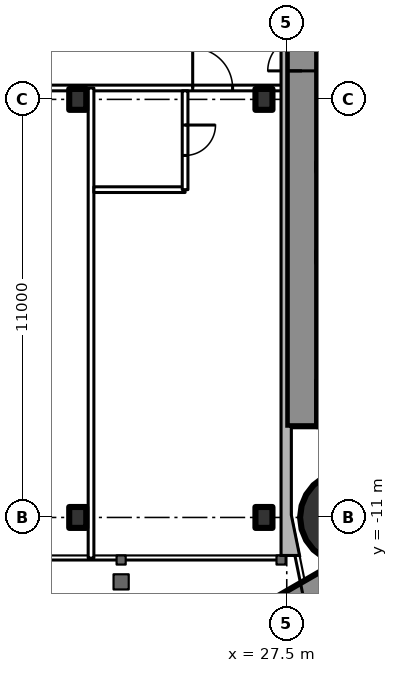
"""IFC4 building model, lengths in metres.
Left out: names, types, materials, properties, quantities, classifications, styles, units other than length and angle.
Written with IfcOpenShell. Run it as: python <this file> out.ifc"""

import sys

from ifc_helpers import new_model, si_unit, direction, frame, frame_2d, origin, origin_2d, place, context, subcontext, project, spatial, rectangle, circle, i_section, extrude, element, fill, save


model = new_model("IFC4")
c1 = context("Model", 3, precision=1e-05, world=origin(), true_north=direction((0.0, 1.0)))
c2 = subcontext(c1, "Body", "Model", "MODEL_VIEW")
j1 = project(units=[si_unit("LENGTHUNIT", "METRE"), si_unit("PLANEANGLEUNIT", "RADIAN")], contexts=[c1])
p1 = place(None, origin())
s1 = spatial("IfcSite", under=j1, at=p1, CompositionType="ELEMENT")
p2 = place(p1, origin())
s2 = spatial("IfcBuilding", under=s1, at=p2, CompositionType="ELEMENT")
p3 = place(p2, frame((0.0, 0.0, 247.7)))
s3 = spatial("IfcBuildingStorey", under=s2, at=p3, CompositionType="ELEMENT", Elevation=247.7)
p4 = place(p3, frame((29.05, -11.0, 0.0), z_axis=(0.0, 0.0, 1.0), x_axis=(1.0, 0.0, 0.0)))
e1 = element("IfcColumn", 1, at=p4, inside=s3, PredefinedType="COLUMN", context=c2, shape_type="SweptSolid", body=[
    extrude(circle(Radius=1.2, at=origin_2d()), origin(), (0.0, 0.0, 1.0), 4.2),
])
p5 = place(p3, frame((27.9, -8.6, 0.0), z_axis=(0.0, 0.0, 1.0), x_axis=(0.0, 1.0, 0.0)))
e2 = element("IfcWall", 2, at=p5, inside=s3, PredefinedType="SHEAR", context=c2, shape_type="SweptSolid", body=[
    extrude(rectangle(XDim=17.2, YDim=0.8, at=frame_2d((8.6, 0.0))), origin(), (0.0, 0.0, 1.0), 4.2),
])
p6 = place(p5, frame((9.35, 0.0, 0.0)))
e3 = element("IfcOpeningElement", 3, at=p6, cuts=e2, PredefinedType="OPENING", context=c2, shape_type="SweptSolid", body=[
    extrude(rectangle(XDim=0.9, YDim=2.2, at=frame_2d((0.45, 1.1))), frame((0.0, 0.41, 0.0), z_axis=(0.0, -1.0, 0.0), x_axis=(1.0, 0.0, 0.0)), (0.0, 0.0, 1.0), 0.82),
])
p7 = place(p3, frame((28.3, -8.0, 0.0), z_axis=(0.0, 0.0, 1.0), x_axis=(1.0, 0.0, 0.0)))
e4 = element("IfcWall", 4, at=p7, inside=s3, PredefinedType="SHEAR", context=c2, shape_type="SweptSolid", body=[
    extrude(rectangle(XDim=8.4, YDim=1.2, at=frame_2d((4.2, 0.0))), origin(), (0.0, 0.0, 1.0), 4.2),
])
p8 = place(p7, frame((0.25, 0.0, 0.0)))
e5 = element("IfcOpeningElement", 5, at=p8, cuts=e4, PredefinedType="OPENING", context=c2, shape_type="SweptSolid", body=[
    extrude(rectangle(XDim=1.0, YDim=2.2, at=frame_2d((0.5, 1.1))), frame((0.0, 0.61, 0.0), z_axis=(0.0, -1.0, 0.0), x_axis=(1.0, 0.0, 0.0)), (0.0, 0.0, 1.0), 1.22),
])
p9 = place(p3, frame((28.3, -4.15, 0.0), z_axis=(0.0, 0.0, 1.0), x_axis=(1.0, 0.0, 0.0)))
e6 = element("IfcWall", 6, at=p9, inside=s3, PredefinedType="SHEAR", context=c2, shape_type="SweptSolid", body=[
    extrude(rectangle(XDim=8.4, YDim=0.3, at=frame_2d((4.2, 0.0))), origin(), (0.0, 0.0, 1.0), 4.2),
])
p10 = place(p3, frame((28.3, -1.775, 0.0), z_axis=(0.0, 0.0, 1.0), x_axis=(1.0, 0.0, 0.0)))
e7 = element("IfcWall", 7, at=p10, inside=s3, PredefinedType="SHEAR", context=c2, shape_type="SweptSolid", body=[
    extrude(rectangle(XDim=2.9, YDim=0.25, at=frame_2d((1.45, 0.0))), origin(), (0.0, 0.0, 1.0), 4.2),
])
p11 = place(p3, frame((27.2, -13.8, 0.0), z_axis=(0.0, 0.0, 1.0), x_axis=(0.866027159892, 0.499996958321, 0.0)))
e8 = element("IfcWall", 8, at=p11, inside=s3, PredefinedType="SHEAR", context=c2, shape_type="SweptSolid", body=[
    extrude(rectangle(XDim=27.947, YDim=1.2, at=frame_2d((13.973, 0.0))), origin(), (0.0, 0.0, 1.0), 4.2),
])
p12 = place(p11, frame((4.6, 0.0, 0.0)))
e9 = element("IfcOpeningElement", 9, at=p12, cuts=e8, PredefinedType="OPENING", context=c2, shape_type="SweptSolid", body=[
    extrude(rectangle(XDim=1.0, YDim=2.2, at=frame_2d((0.5, 1.1))), frame((0.0, 0.61, 0.0), z_axis=(0.0, -1.0, 0.0), x_axis=(1.0, 0.0, 0.0)), (0.0, 0.0, 1.0), 1.22),
])
p13 = place(p11, frame((13.395, 0.0, 0.0)))
e10 = element("IfcOpeningElement", 10, at=p13, cuts=e8, PredefinedType="OPENING", context=c2, shape_type="SweptSolid", body=[
    extrude(rectangle(XDim=1.8, YDim=2.2, at=frame_2d((0.9, 1.1))), frame((0.0, 0.61, 0.0), z_axis=(0.0, -1.0, 0.0), x_axis=(1.0, 0.0, 0.0)), (0.0, 0.0, 1.0), 1.22),
])
p14 = place(p3, frame((27.2, 13.8, 0.0), z_axis=(0.0, 0.0, 1.0), x_axis=(0.866024515034, -0.500001539357, 0.0)))
e11 = element("IfcWall", 11, at=p14, inside=s3, PredefinedType="SHEAR", context=c2, shape_type="SweptSolid", body=[
    extrude(rectangle(XDim=26.907, YDim=1.2, at=frame_2d((13.454, 0.0))), origin(), (0.0, 0.0, 1.0), 4.2),
])
p15 = place(p14, frame((4.6, 0.0, 0.0)))
e12 = element("IfcOpeningElement", 12, at=p15, cuts=e11, PredefinedType="OPENING", context=c2, shape_type="SweptSolid", body=[
    extrude(rectangle(XDim=1.0, YDim=2.2, at=frame_2d((0.5, 1.1))), frame((0.0, 0.61, 0.0), z_axis=(0.0, -1.0, 0.0), x_axis=(1.0, 0.0, 0.0)), (0.0, 0.0, 1.0), 1.22),
])
p16 = place(p14, frame((13.395, 0.0, 0.0)))
e13 = element("IfcOpeningElement", 13, at=p16, cuts=e11, PredefinedType="OPENING", context=c2, shape_type="SweptSolid", body=[
    extrude(rectangle(XDim=1.8, YDim=2.2, at=frame_2d((0.9, 1.1))), frame((0.0, 0.61, 0.0), z_axis=(0.0, -1.0, 0.0), x_axis=(1.0, 0.0, 0.0)), (0.0, 0.0, 1.0), 1.22),
])
for number, where, z_axis, x_axis in (
    (14, (22.0, -11.0, 0.0), (0.0, 0.0, 1.0), (1.0, 0.0, 0.0)),
    (15, (26.9, -11.0, 0.0), (0.0, 0.0, 1.0), (1.0, 0.0, 0.0)),
    (16, (22.0, 0.0, 0.0), (0.0, 0.0, 1.0), (1.0, 0.0, 0.0)),
    (17, (26.9, 0.0, 0.0), (0.0, 0.0, 1.0), (1.0, 0.0, 0.0)),
):
    element("IfcColumn", number, at=place(p3, frame(where, z_axis=z_axis, x_axis=x_axis)), inside=s3, PredefinedType="COLUMN", context=c2, shape_type="SweptSolid", body=[
        extrude(i_section(OverallWidth=0.448, OverallDepth=0.55, WebThickness=0.072, FlangeThickness=0.115, FilletRadius=0.02, at=origin_2d()), origin(), (0.0, 0.0, 1.0), 4.2),
    ])
p17 = place(p3, frame((-27.5, 0.3, 0.0), z_axis=(0.0, 0.0, 1.0), x_axis=(1.0, 0.0, 0.0)))
e18 = element("IfcWall", 18, at=p17, inside=s3, PredefinedType="PARTITIONING", context=c2, shape_type="SweptSolid", body=[
    extrude(rectangle(XDim=55.0, YDim=0.15, at=frame_2d((27.5, 0.0))), origin(), (0.0, 0.0, 1.0), 3.0),
])
p18 = place(p17, frame((1.575, 0.0, 0.0)))
e19 = element("IfcOpeningElement", 19, at=p18, cuts=e18, PredefinedType="OPENING", context=c2, shape_type="SweptSolid", body=[
    extrude(rectangle(XDim=1.0, YDim=2.2, at=frame_2d((0.5, 1.1))), frame((0.0, 0.085, 0.0), z_axis=(0.0, -1.0, 0.0), x_axis=(1.0, 0.0, 0.0)), (0.0, 0.0, 1.0), 0.17),
])
p19 = place(p17, frame((8.525, 0.0, 0.0)))
e20 = element("IfcOpeningElement", 20, at=p19, cuts=e18, PredefinedType="OPENING", context=c2, shape_type="SweptSolid", body=[
    extrude(rectangle(XDim=1.05, YDim=2.4, at=frame_2d((0.525, 1.2))), frame((0.0, 0.085, 0.0), z_axis=(0.0, -1.0, 0.0), x_axis=(1.0, 0.0, 0.0)), (0.0, 0.0, 1.0), 0.17),
])
p20 = place(p17, frame((19.525, 0.0, 0.0)))
e21 = element("IfcOpeningElement", 21, at=p20, cuts=e18, PredefinedType="OPENING", context=c2, shape_type="SweptSolid", body=[
    extrude(rectangle(XDim=1.05, YDim=2.4, at=frame_2d((0.525, 1.2))), frame((0.0, 0.085, 0.0), z_axis=(0.0, -1.0, 0.0), x_axis=(1.0, 0.0, 0.0)), (0.0, 0.0, 1.0), 0.17),
])
p21 = place(p17, frame((25.025, 0.0, 0.0)))
e22 = element("IfcOpeningElement", 22, at=p21, cuts=e18, PredefinedType="OPENING", context=c2, shape_type="SweptSolid", body=[
    extrude(rectangle(XDim=1.05, YDim=2.4, at=frame_2d((0.525, 1.2))), frame((0.0, 0.085, 0.0), z_axis=(0.0, -1.0, 0.0), x_axis=(1.0, 0.0, 0.0)), (0.0, 0.0, 1.0), 0.17),
])
p22 = place(p17, frame((30.525, 0.0, 0.0)))
e23 = element("IfcOpeningElement", 23, at=p22, cuts=e18, PredefinedType="OPENING", context=c2, shape_type="SweptSolid", body=[
    extrude(rectangle(XDim=1.05, YDim=2.4, at=frame_2d((0.525, 1.2))), frame((0.0, 0.085, 0.0), z_axis=(0.0, -1.0, 0.0), x_axis=(1.0, 0.0, 0.0)), (0.0, 0.0, 1.0), 0.17),
])
p23 = place(p17, frame((41.525, 0.0, 0.0)))
e24 = element("IfcOpeningElement", 24, at=p23, cuts=e18, PredefinedType="OPENING", context=c2, shape_type="SweptSolid", body=[
    extrude(rectangle(XDim=1.05, YDim=2.4, at=frame_2d((0.525, 1.2))), frame((0.0, 0.085, 0.0), z_axis=(0.0, -1.0, 0.0), x_axis=(1.0, 0.0, 0.0)), (0.0, 0.0, 1.0), 0.17),
])
p24 = place(p17, frame((52.525, 0.0, 0.0)))
e25 = element("IfcOpeningElement", 25, at=p24, cuts=e18, PredefinedType="OPENING", context=c2, shape_type="SweptSolid", body=[
    extrude(rectangle(XDim=1.05, YDim=2.4, at=frame_2d((0.525, 1.2))), frame((0.0, 0.085, 0.0), z_axis=(0.0, -1.0, 0.0), x_axis=(1.0, 0.0, 0.0)), (0.0, 0.0, 1.0), 0.17),
])
p25 = place(p3, frame((22.35, -12.07, 0.0), z_axis=(0.0, 0.0, 1.0), x_axis=(0.0, 1.0, 0.0)))
e26 = element("IfcWall", 26, at=p25, inside=s3, PredefinedType="PARTITIONING", context=c2, shape_type="SweptSolid", body=[
    extrude(rectangle(XDim=12.37, YDim=0.15, at=frame_2d((6.185, 0.0))), origin(), (0.0, 0.0, 1.0), 4.0),
])
p26 = place(p3, frame((22.425, -2.375, 0.0), z_axis=(0.0, 0.0, 1.0), x_axis=(1.0, 0.0, 0.0)))
e27 = element("IfcWall", 27, at=p26, inside=s3, PredefinedType="PARTITIONING", context=c2, shape_type="SweptSolid", body=[
    extrude(rectangle(XDim=2.4, YDim=0.15, at=frame_2d((1.2, 0.0))), origin(), (0.0, 0.0, 1.0), 4.0),
])
p27 = place(p3, frame((24.825, -2.375, 0.0), z_axis=(0.0, 0.0, 1.0), x_axis=(0.0, 1.0, 0.0)))
e28 = element("IfcWall", 28, at=p27, inside=s3, PredefinedType="PARTITIONING", context=c2, shape_type="SweptSolid", body=[
    extrude(rectangle(XDim=2.6, YDim=0.15, at=frame_2d((1.3, 0.0))), origin(), (0.0, 0.0, 1.0), 4.0),
])
p28 = place(p27, frame((0.9, 0.0, 0.0)))
e29 = element("IfcOpeningElement", 29, at=p28, cuts=e28, PredefinedType="OPENING", context=c2, shape_type="SweptSolid", body=[
    extrude(rectangle(XDim=0.8, YDim=2.2, at=frame_2d((0.4, 1.1))), frame((0.0, 0.085, 0.0), z_axis=(0.0, -1.0, 0.0), x_axis=(1.0, 0.0, 0.0)), (0.0, 0.0, 1.0), 0.17),
])
p29 = place(p6, origin())
e30 = element("IfcDoor", 30, at=p29, inside=s3, OperationType="SINGLE_SWING_LEFT", PredefinedType="DOOR", context=c2, shape_type="SweptSolid", body=[
    extrude(rectangle(XDim=0.9, YDim=2.2, at=frame_2d((0.45, 1.1))), frame((0.0, 0.025, 0.0), z_axis=(0.0, -1.0, 0.0), x_axis=(1.0, 0.0, 0.0)), (0.0, 0.0, 1.0), 0.05),
])
fill(e3, e30)
p30 = place(p28, origin())
e31 = element("IfcDoor", 31, at=p30, inside=s3, OperationType="SINGLE_SWING_RIGHT", PredefinedType="DOOR", context=c2, shape_type="SweptSolid", body=[
    extrude(rectangle(XDim=0.8, YDim=2.2, at=frame_2d((0.4, 1.1))), frame((0.0, 0.025, 0.0), z_axis=(0.0, -1.0, 0.0), x_axis=(1.0, 0.0, 0.0)), (0.0, 0.0, 1.0), 0.05),
])
fill(e29, e31)
p31 = place(p24, origin())
e32 = element("IfcDoor", 32, at=p31, inside=s3, OperationType="SINGLE_SWING_LEFT", PredefinedType="DOOR", context=c2, shape_type="SweptSolid", body=[
    extrude(rectangle(XDim=1.05, YDim=2.4, at=frame_2d((0.525, 1.2))), frame((0.0, 0.025, 0.0), z_axis=(0.0, -1.0, 0.0), x_axis=(1.0, 0.0, 0.0)), (0.0, 0.0, 1.0), 0.05),
])
fill(e25, e32)
save(model, sys.argv[1])
